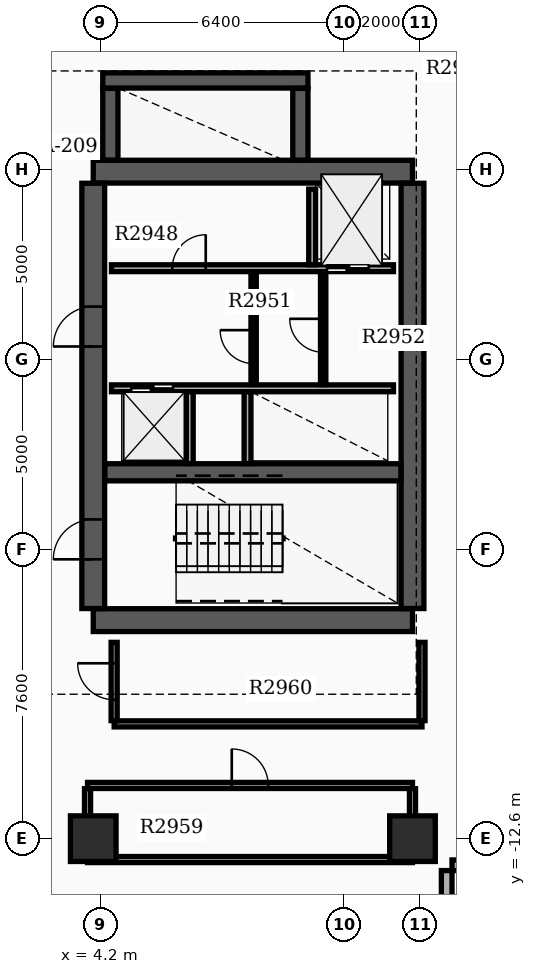
"""IFC4 building model, lengths in metres.
Left out: names, types, materials, properties, quantities, classifications, styles, units other than length and angle.
Written with IfcOpenShell. Run it as: python <this file> out.ifc"""

import sys

from ifc_helpers import new_model, si_unit, direction, frame, frame_2d, origin, origin_2d, place, context, subcontext, project, spatial, rectangle, extrude, element, fill, save


model = new_model("IFC4")
c1 = context("Model", 3, precision=1e-05, world=origin(), true_north=direction((0.0, 1.0)))
c2 = subcontext(c1, "Body", "Model", "MODEL_VIEW")
j1 = project(units=[si_unit("LENGTHUNIT", "METRE"), si_unit("PLANEANGLEUNIT", "RADIAN")], contexts=[c1])
p1 = place(None, origin())
s1 = spatial("IfcSite", under=j1, at=p1, CompositionType="ELEMENT")
p2 = place(p1, origin())
s2 = spatial("IfcBuilding", under=s1, at=p2, CompositionType="ELEMENT")
p3 = place(p2, frame((0.0, 0.0, 183.9)))
s3 = spatial("IfcBuildingStorey", under=s2, at=p3, CompositionType="ELEMENT", Elevation=183.9)
for number, where, z_axis, x_axis in (
    (1, (4.0, -6.85, 0.0), (0.0, 0.0, 1.0), (1.0, 0.0, 0.0)),
    (2, (4.0, 4.95, 0.0), (0.0, 0.0, 1.0), (1.0, 0.0, 0.0)),
):
    element("IfcWall", number, at=place(p3, frame(where, z_axis=z_axis, x_axis=x_axis)), inside=s3, PredefinedType="SHEAR", context=c2, shape_type="SweptSolid", body=[
        extrude(rectangle(XDim=8.4, YDim=0.6, at=frame_2d((4.2, 0.0))), origin(), (0.0, 0.0, 1.0), 3.7),
    ])
p4 = place(p3, frame((4.0, -6.545, 0.0), z_axis=(0.0, 0.0, 1.0), x_axis=(0.0, 1.0, 0.0)))
e3 = element("IfcWall", 3, at=p4, inside=s3, PredefinedType="SHEAR", context=c2, shape_type="SweptSolid", body=[
    extrude(rectangle(XDim=11.19, YDim=0.6, at=frame_2d((5.595, 0.0))), origin(), (0.0, 0.0, 1.0), 3.7),
])
p5 = place(p4, frame((1.295, 0.0, 0.0)))
e4 = element("IfcOpeningElement", 4, at=p5, cuts=e3, PredefinedType="OPENING", context=c2, shape_type="SweptSolid", body=[
    extrude(rectangle(XDim=1.05, YDim=2.15, at=frame_2d((0.525, 1.075))), frame((0.0, 0.31, 0.0), z_axis=(0.0, -1.0, 0.0), x_axis=(1.0, 0.0, 0.0)), (0.0, 0.0, 1.0), 0.62),
])
p6 = place(p4, frame((6.895, 0.0, 0.0)))
e5 = element("IfcOpeningElement", 5, at=p6, cuts=e3, PredefinedType="OPENING", context=c2, shape_type="SweptSolid", body=[
    extrude(rectangle(XDim=1.05, YDim=2.15, at=frame_2d((0.525, 1.075))), frame((0.0, 0.31, 0.0), z_axis=(0.0, -1.0, 0.0), x_axis=(1.0, 0.0, 0.0)), (0.0, 0.0, 1.0), 0.62),
])
p7 = place(p3, frame((12.4, -6.545, 0.0), z_axis=(0.0, 0.0, 1.0), x_axis=(0.0, 1.0, 0.0)))
e6 = element("IfcWall", 6, at=p7, inside=s3, PredefinedType="SHEAR", context=c2, shape_type="SweptSolid", body=[
    extrude(rectangle(XDim=11.19, YDim=0.6, at=frame_2d((5.595, 0.0))), origin(), (0.0, 0.0, 1.0), 3.7),
])
p8 = place(p3, frame((4.305, -2.96, 0.0), z_axis=(0.0, 0.0, 1.0), x_axis=(1.0, 0.0, 0.0)))
e7 = element("IfcWall", 7, at=p8, inside=s3, PredefinedType="SHEAR", context=c2, shape_type="SweptSolid", body=[
    extrude(rectangle(XDim=7.79, YDim=0.45, at=frame_2d((3.895, 0.0))), origin(), (0.0, 0.0, 1.0), 3.7),
])
p9 = place(p3, frame((4.45, 5.255, 0.0), z_axis=(0.0, 0.0, 1.0), x_axis=(0.0, 1.0, 0.0)))
e8 = element("IfcWall", 8, at=p9, inside=s3, PredefinedType="SHEAR", context=c2, shape_type="SweptSolid", body=[
    extrude(rectangle(XDim=1.885, YDim=0.4, at=frame_2d((0.942, 0.0))), origin(), (0.0, 0.0, 1.0), 3.7),
])
p10 = place(p3, frame((4.25, 7.35, 0.0), z_axis=(0.0, 0.0, 1.0), x_axis=(1.0, 0.0, 0.0)))
e9 = element("IfcWall", 9, at=p10, inside=s3, PredefinedType="SHEAR", context=c2, shape_type="SweptSolid", body=[
    extrude(rectangle(XDim=5.4, YDim=0.4, at=frame_2d((2.7, 0.0))), origin(), (0.0, 0.0, 1.0), 3.7),
])
p11 = place(p3, frame((9.45, 5.255, 0.0), z_axis=(0.0, 0.0, 1.0), x_axis=(0.0, 1.0, 0.0)))
e10 = element("IfcWall", 10, at=p11, inside=s3, PredefinedType="SHEAR", context=c2, shape_type="SweptSolid", body=[
    extrude(rectangle(XDim=1.885, YDim=0.4, at=frame_2d((0.942, 0.0))), origin(), (0.0, 0.0, 1.0), 3.7),
])
for number, where, z_axis, x_axis in (
    (11, (12.4, -12.6, 0.0), (0.0, 0.0, 1.0), (1.0, 0.0, 0.0)),
    (12, (4.0, -12.6, 0.0), (0.0, 0.0, 1.0), (1.0, 0.0, 0.0)),
):
    element("IfcColumn", number, at=place(p3, frame(where, z_axis=z_axis, x_axis=x_axis)), inside=s3, PredefinedType="COLUMN", context=c2, shape_type="SweptSolid", body=[
        extrude(rectangle(XDim=1.2, YDim=1.2, at=origin_2d()), origin(), (0.0, 0.0, 1.0), 3.9),
    ])
p12 = place(p3, frame((14.66, -13.3, 0.0), z_axis=(0.0, 0.0, 1.0), x_axis=(-1.0, 0.0, 0.0)))
e13 = element("IfcWall", 13, at=p12, inside=s3, PredefinedType="STANDARD", context=c2, shape_type="SweptSolid", body=[
    extrude(rectangle(XDim=1.22, YDim=0.28, at=frame_2d((0.61, 0.0))), origin(), (0.0, 0.0, 1.0), 2.97),
])
p13 = place(p3, frame((13.3, -13.44, 0.0), z_axis=(0.0, 0.0, 1.0), x_axis=(0.0, -1.0, 0.0)))
e14 = element("IfcWall", 14, at=p13, inside=s3, PredefinedType="STANDARD", context=c2, shape_type="SweptSolid", body=[
    extrude(rectangle(XDim=1.5, YDim=0.28, at=frame_2d((0.75, 0.0))), origin(), (0.0, 0.0, 1.0), 2.97),
])
p14 = place(p3, frame((4.48, 2.41, 0.0), z_axis=(0.0, 0.0, 1.0), x_axis=(1.0, 0.0, 0.0)))
e15 = element("IfcWall", 15, at=p14, inside=s3, PredefinedType="SOLIDWALL", context=c2, shape_type="SweptSolid", body=[
    extrude(rectangle(XDim=7.42, YDim=0.18, at=frame_2d((3.71, 0.0))), origin(), (0.0, 0.0, 1.0), 2.96),
])
p15 = place(p14, frame((5.67, 0.0, 0.0)))
e16 = element("IfcOpeningElement", 16, at=p15, cuts=e15, PredefinedType="OPENING", context=c2, shape_type="SweptSolid", body=[
    extrude(rectangle(XDim=1.1, YDim=2.15, at=frame_2d((0.55, 1.075))), frame((0.0, 0.1, 0.0), z_axis=(0.0, -1.0, 0.0), x_axis=(1.0, 0.0, 0.0)), (0.0, 0.0, 1.0), 0.2),
])
p16 = place(p14, frame((1.6, 0.0, 0.0)))
e17 = element("IfcOpeningElement", 17, at=p16, cuts=e15, PredefinedType="OPENING", context=c2, shape_type="SweptSolid", body=[
    extrude(rectangle(XDim=0.88, YDim=2.1, at=frame_2d((0.44, 1.05))), frame((0.0, 0.1, 0.0), z_axis=(0.0, -1.0, 0.0), x_axis=(1.0, 0.0, 0.0)), (0.0, 0.0, 1.0), 0.2),
])
p17 = place(p3, frame((4.48, -0.75, 0.0), z_axis=(0.0, 0.0, 1.0), x_axis=(1.0, 0.0, 0.0)))
e18 = element("IfcWall", 18, at=p17, inside=s3, PredefinedType="SOLIDWALL", context=c2, shape_type="SweptSolid", body=[
    extrude(rectangle(XDim=7.42, YDim=0.18, at=frame_2d((3.71, 0.0))), origin(), (0.0, 0.0, 1.0), 2.96),
])
p18 = place(p17, frame((0.52, 0.0, 0.0)))
e19 = element("IfcOpeningElement", 19, at=p18, cuts=e18, PredefinedType="OPENING", context=c2, shape_type="SweptSolid", body=[
    extrude(rectangle(XDim=1.1, YDim=2.15, at=frame_2d((0.55, 1.075))), frame((0.0, 0.1, 0.0), z_axis=(0.0, -1.0, 0.0), x_axis=(1.0, 0.0, 0.0)), (0.0, 0.0, 1.0), 0.2),
])
p19 = place(p3, frame((9.76, 2.5, 0.0), z_axis=(0.0, 0.0, 1.0), x_axis=(0.0, 1.0, 0.0)))
e20 = element("IfcWall", 20, at=p19, inside=s3, PredefinedType="SOLIDWALL", context=c2, shape_type="SweptSolid", body=[
    extrude(rectangle(XDim=1.99, YDim=0.18, at=frame_2d((0.995, 0.0))), origin(), (0.0, 0.0, 1.0), 2.96),
])
for number, where, z_axis, x_axis in (
    (21, (6.54, -2.73, 0.0), (0.0, 0.0, 1.0), (0.0, 1.0, 0.0)),
    (22, (8.06, -2.73, 0.0), (0.0, 0.0, 1.0), (0.0, 1.0, 0.0)),
):
    element("IfcWall", number, at=place(p3, frame(where, z_axis=z_axis, x_axis=x_axis)), inside=s3, PredefinedType="SOLIDWALL", context=c2, shape_type="SweptSolid", body=[
        extrude(rectangle(XDim=1.89, YDim=0.18, at=frame_2d((0.945, 0.0))), origin(), (0.0, 0.0, 1.0), 2.96),
    ])
p20 = place(p3, frame((8.22, -0.65, 0.0), z_axis=(0.0, 0.0, 1.0), x_axis=(0.0, 1.0, 0.0)))
e23 = element("IfcWall", 23, at=p20, inside=s3, PredefinedType="SOLIDWALL", context=c2, shape_type="SweptSolid", body=[
    extrude(rectangle(XDim=2.96, YDim=0.14, at=frame_2d((1.48, 0.0))), origin(), (0.0, 0.0, 1.0), 2.96),
])
p21 = place(p20, frame((0.55, 0.0, 0.0)))
e24 = element("IfcOpeningElement", 24, at=p21, cuts=e23, PredefinedType="OPENING", context=c2, shape_type="SweptSolid", body=[
    extrude(rectangle(XDim=0.88, YDim=2.1, at=frame_2d((0.44, 1.05))), frame((0.0, 0.08, 0.0), z_axis=(0.0, -1.0, 0.0), x_axis=(1.0, 0.0, 0.0)), (0.0, 0.0, 1.0), 0.16),
])
p22 = place(p3, frame((10.05, -0.652, 0.0), z_axis=(0.0, 0.0, 1.0), x_axis=(0.0, 1.0, 0.0)))
e25 = element("IfcWall", 25, at=p22, inside=s3, PredefinedType="PARTITIONING", context=c2, shape_type="SweptSolid", body=[
    extrude(rectangle(XDim=2.962, YDim=0.14, at=frame_2d((1.481, 0.0))), origin(), (0.0, 0.0, 1.0), 2.96),
])
p23 = place(p22, frame((0.85, 0.0, 0.0)))
e26 = element("IfcOpeningElement", 26, at=p23, cuts=e25, PredefinedType="OPENING", context=c2, shape_type="SweptSolid", body=[
    extrude(rectangle(XDim=0.88, YDim=2.1, at=frame_2d((0.44, 1.05))), frame((0.0, 0.08, 0.0), z_axis=(0.0, -1.0, 0.0), x_axis=(1.0, 0.0, 0.0)), (0.0, 0.0, 1.0), 0.16),
])
p24 = place(p3, frame((3.85, -13.15, 0.0), z_axis=(0.0, 0.0, 1.0), x_axis=(1.0, 0.0, 0.0)))
e27 = element("IfcWall", 27, at=p24, inside=s3, PredefinedType="PARTITIONING", context=c2, shape_type="SweptSolid", body=[
    extrude(rectangle(XDim=8.55, YDim=0.16, at=frame_2d((4.275, 0.0))), origin(), (0.0, 0.0, 1.0), 2.96),
])
p25 = place(p3, frame((3.85, -11.2, 0.0), z_axis=(0.0, 0.0, 1.0), x_axis=(1.0, 0.0, 0.0)))
e28 = element("IfcWall", 28, at=p25, inside=s3, PredefinedType="PARTITIONING", context=c2, shape_type="SweptSolid", body=[
    extrude(rectangle(XDim=8.55, YDim=0.16, at=frame_2d((4.275, 0.0))), origin(), (0.0, 0.0, 1.0), 2.96),
])
p26 = place(p25, frame((3.795, 0.0, 0.0)))
e29 = element("IfcOpeningElement", 29, at=p26, cuts=e28, PredefinedType="OPENING", context=c2, shape_type="SweptSolid", body=[
    extrude(rectangle(XDim=0.96, YDim=2.15, at=frame_2d((0.48, 1.075))), frame((0.0, 0.09, 0.0), z_axis=(0.0, -1.0, 0.0), x_axis=(1.0, 0.0, 0.0)), (0.0, 0.0, 1.0), 0.18),
])
for number, where, z_axis, x_axis in (
    (30, (3.85, -13.065, 0.0), (0.0, 0.0, 1.0), (0.0, 1.0, 0.0)),
    (31, (12.4, -13.065, 0.0), (0.0, 0.0, 1.0), (0.0, 1.0, 0.0)),
):
    element("IfcWall", number, at=place(p3, frame(where, z_axis=z_axis, x_axis=x_axis)), inside=s3, PredefinedType="PARTITIONING", context=c2, shape_type="SweptSolid", body=[
        extrude(rectangle(XDim=1.78, YDim=0.16, at=frame_2d((0.89, 0.0))), origin(), (0.0, 0.0, 1.0), 2.96),
    ])
p27 = place(p3, frame((4.55, -9.58, 0.0), z_axis=(0.0, 0.0, 1.0), x_axis=(1.0, 0.0, 0.0)))
e32 = element("IfcWall", 32, at=p27, inside=s3, PredefinedType="PARTITIONING", context=c2, shape_type="SweptSolid", body=[
    extrude(rectangle(XDim=8.1, YDim=0.16, at=frame_2d((4.05, 0.0))), origin(), (0.0, 0.0, 1.0), 2.96),
])
p28 = place(p3, frame((4.55, -9.495, 0.0), z_axis=(0.0, 0.0, 1.0), x_axis=(0.0, 1.0, 0.0)))
e33 = element("IfcWall", 33, at=p28, inside=s3, PredefinedType="PARTITIONING", context=c2, shape_type="SweptSolid", body=[
    extrude(rectangle(XDim=2.06, YDim=0.16, at=frame_2d((1.03, 0.0))), origin(), (0.0, 0.0, 1.0), 2.96),
])
p29 = place(p28, frame((0.55, 0.0, 0.0)))
e34 = element("IfcOpeningElement", 34, at=p29, cuts=e33, PredefinedType="OPENING", context=c2, shape_type="SweptSolid", body=[
    extrude(rectangle(XDim=0.96, YDim=2.15, at=frame_2d((0.48, 1.075))), frame((0.0, 0.09, 0.0), z_axis=(0.0, -1.0, 0.0), x_axis=(1.0, 0.0, 0.0)), (0.0, 0.0, 1.0), 0.18),
])
p30 = place(p3, frame((12.65, -9.495, 0.0), z_axis=(0.0, 0.0, 1.0), x_axis=(0.0, 1.0, 0.0)))
e35 = element("IfcWall", 35, at=p30, inside=s3, PredefinedType="PARTITIONING", context=c2, shape_type="SweptSolid", body=[
    extrude(rectangle(XDim=2.06, YDim=0.16, at=frame_2d((1.03, 0.0))), origin(), (0.0, 0.0, 1.0), 2.96),
])
p31 = place(p5, origin())
e36 = element("IfcDoor", 36, at=p31, inside=s3, OperationType="SINGLE_SWING_LEFT", PredefinedType="DOOR", context=c2, shape_type="SweptSolid", body=[
    extrude(rectangle(XDim=1.05, YDim=2.15, at=frame_2d((0.525, 1.075))), frame((0.0, 0.025, 0.0), z_axis=(0.0, -1.0, 0.0), x_axis=(1.0, 0.0, 0.0)), (0.0, 0.0, 1.0), 0.05),
])
fill(e4, e36)
p32 = place(p6, origin())
e37 = element("IfcDoor", 37, at=p32, inside=s3, OperationType="SINGLE_SWING_LEFT", PredefinedType="DOOR", context=c2, shape_type="SweptSolid", body=[
    extrude(rectangle(XDim=1.05, YDim=2.15, at=frame_2d((0.525, 1.075))), frame((0.0, 0.025, 0.0), z_axis=(0.0, -1.0, 0.0), x_axis=(1.0, 0.0, 0.0)), (0.0, 0.0, 1.0), 0.05),
])
fill(e5, e37)
p33 = place(p15, origin())
e38 = element("IfcDoor", 38, at=p33, inside=s3, OperationType="DOUBLE_DOOR_SLIDING", PredefinedType="DOOR", context=c2, shape_type="SweptSolid", body=[
    extrude(rectangle(XDim=1.1, YDim=2.15, at=frame_2d((0.55, 1.075))), frame((0.0, 0.025, 0.0), z_axis=(0.0, -1.0, 0.0), x_axis=(1.0, 0.0, 0.0)), (0.0, 0.0, 1.0), 0.05),
])
fill(e16, e38)
p34 = place(p18, origin())
e39 = element("IfcDoor", 39, at=p34, inside=s3, OperationType="DOUBLE_DOOR_SLIDING", PredefinedType="DOOR", context=c2, shape_type="SweptSolid", body=[
    extrude(rectangle(XDim=1.1, YDim=2.15, at=frame_2d((0.55, 1.075))), frame((0.0, 0.025, 0.0), z_axis=(0.0, -1.0, 0.0), x_axis=(1.0, 0.0, 0.0)), (0.0, 0.0, 1.0), 0.05),
])
fill(e19, e39)
p35 = place(p16, origin())
e40 = element("IfcDoor", 40, at=p35, inside=s3, OperationType="SINGLE_SWING_RIGHT", PredefinedType="DOOR", context=c2, shape_type="SweptSolid", body=[
    extrude(rectangle(XDim=0.88, YDim=2.1, at=frame_2d((0.44, 1.05))), frame((0.0, 0.025, 0.0), z_axis=(0.0, -1.0, 0.0), x_axis=(1.0, 0.0, 0.0)), (0.0, 0.0, 1.0), 0.05),
])
fill(e17, e40)
p36 = place(p21, origin())
e41 = element("IfcDoor", 41, at=p36, inside=s3, OperationType="SINGLE_SWING_RIGHT", PredefinedType="DOOR", context=c2, shape_type="SweptSolid", body=[
    extrude(rectangle(XDim=0.88, YDim=2.1, at=frame_2d((0.44, 1.05))), frame((0.0, 0.025, 0.0), z_axis=(0.0, -1.0, 0.0), x_axis=(1.0, 0.0, 0.0)), (0.0, 0.0, 1.0), 0.05),
])
fill(e24, e41)
p37 = place(p23, origin())
e42 = element("IfcDoor", 42, at=p37, inside=s3, OperationType="SINGLE_SWING_RIGHT", PredefinedType="DOOR", context=c2, shape_type="SweptSolid", body=[
    extrude(rectangle(XDim=0.88, YDim=2.1, at=frame_2d((0.44, 1.05))), frame((0.0, 0.025, 0.0), z_axis=(0.0, -1.0, 0.0), x_axis=(1.0, 0.0, 0.0)), (0.0, 0.0, 1.0), 0.05),
])
fill(e26, e42)
p38 = place(p26, origin())
e43 = element("IfcDoor", 43, at=p38, inside=s3, OperationType="SINGLE_SWING_LEFT", PredefinedType="DOOR", context=c2, shape_type="SweptSolid", body=[
    extrude(rectangle(XDim=0.96, YDim=2.15, at=frame_2d((0.48, 1.075))), frame((0.0, 0.025, 0.0), z_axis=(0.0, -1.0, 0.0), x_axis=(1.0, 0.0, 0.0)), (0.0, 0.0, 1.0), 0.05),
])
fill(e29, e43)
p39 = place(p29, origin())
e44 = element("IfcDoor", 44, at=p39, inside=s3, OperationType="SINGLE_SWING_RIGHT", PredefinedType="DOOR", context=c2, shape_type="SweptSolid", body=[
    extrude(rectangle(XDim=0.96, YDim=2.15, at=frame_2d((0.48, 1.075))), frame((0.0, 0.025, 0.0), z_axis=(0.0, -1.0, 0.0), x_axis=(1.0, 0.0, 0.0)), (0.0, 0.0, 1.0), 0.05),
])
fill(e34, e44)
save(model, sys.argv[1])
